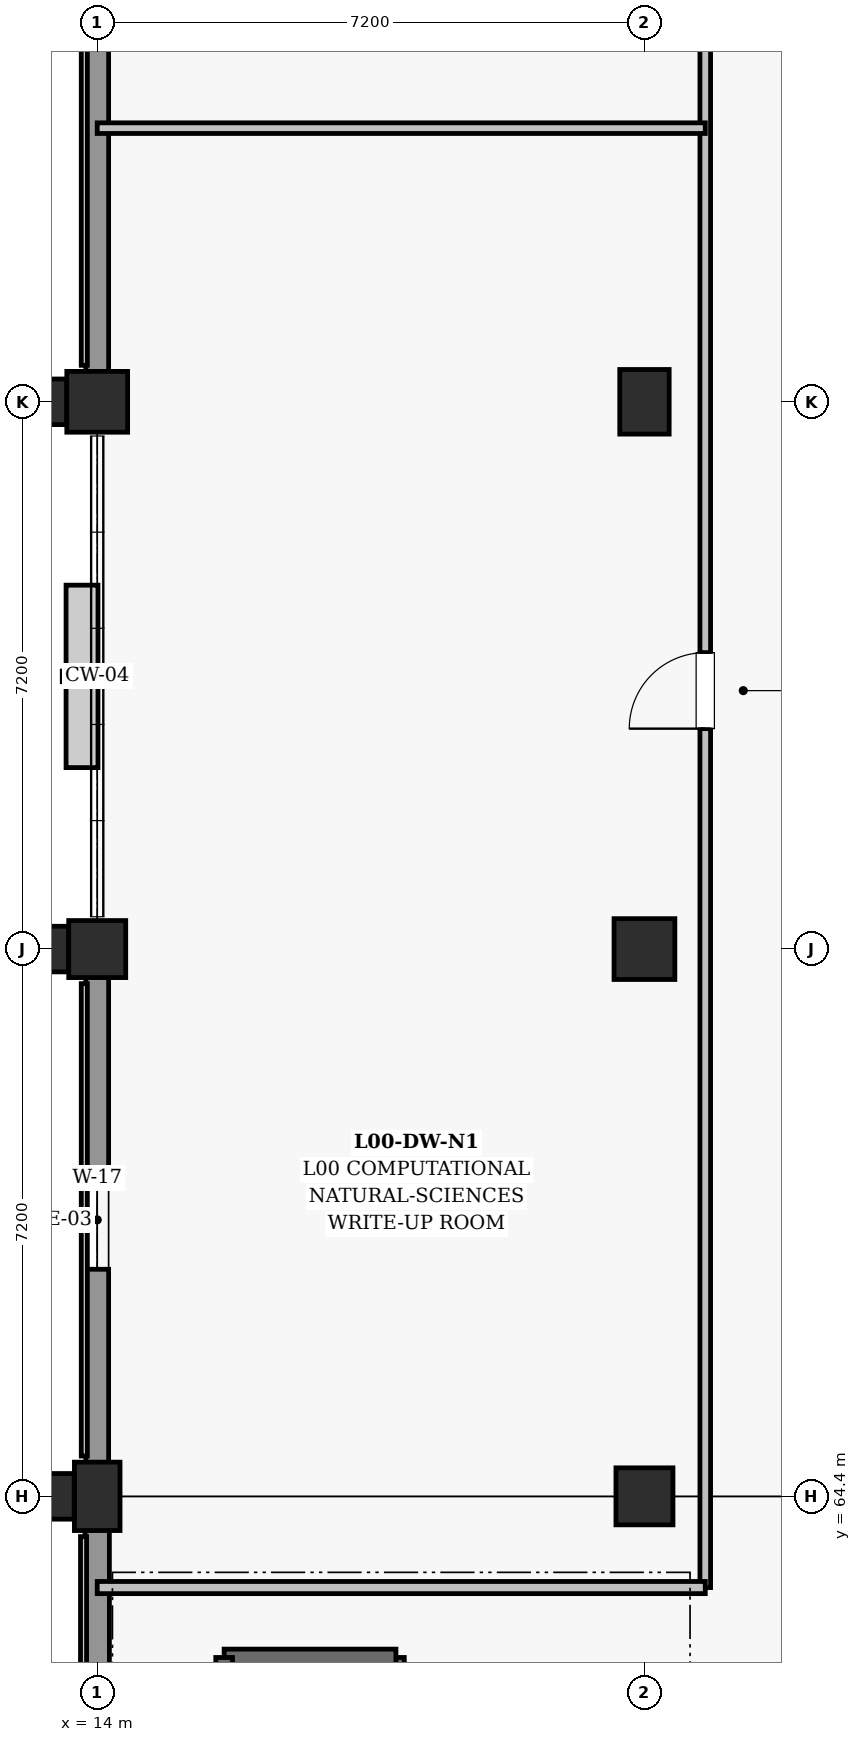
"""IFC4 building model, lengths in metres.
Left out: names, types, materials, properties, quantities, classifications, styles, units other than length and angle.
Written with IfcOpenShell. Run it as: python <this file> out.ifc"""

import sys

from ifc_helpers import new_model, si_unit, direction, frame, frame_2d, origin, origin_2d, place, context, subcontext, project, spatial, rectangle, extrude, element, fill, save


model = new_model("IFC4")
c1 = context("Model", 3, precision=1e-05, world=origin(), true_north=direction((0.0, 1.0)))
c2 = subcontext(c1, "Body", "Model", "MODEL_VIEW")
j1 = project(units=[si_unit("LENGTHUNIT", "METRE"), si_unit("PLANEANGLEUNIT", "RADIAN")], contexts=[c1])
p1 = place(None, origin())
s1 = spatial("IfcSite", under=j1, at=p1, CompositionType="ELEMENT")
p2 = place(p1, origin())
s2 = spatial("IfcBuilding", under=s1, at=p2, CompositionType="ELEMENT")
p3 = place(p2, origin())
s3 = spatial("IfcBuildingStorey", under=s2, at=p3, CompositionType="ELEMENT", Elevation=0.0)
p4 = place(p3, frame((14.0, 64.4, 0.0), z_axis=(0.0, 0.0, 1.0), x_axis=(1.0, 0.0, 0.0)))
e1 = element("IfcColumn", 1, at=p4, inside=s3, PredefinedType="COLUMN", context=c2, shape_type="SweptSolid", body=[
    extrude(rectangle(XDim=0.6, YDim=0.9, at=origin_2d()), origin(), (0.0, 0.0, 1.0), 5.4),
])
p5 = place(p3, frame((14.0, 71.6, 0.0), z_axis=(0.0, 0.0, 1.0), x_axis=(1.0, 0.0, 0.0)))
e2 = element("IfcColumn", 2, at=p5, inside=s3, PredefinedType="COLUMN", context=c2, shape_type="SweptSolid", body=[
    extrude(rectangle(XDim=0.75, YDim=0.75, at=origin_2d()), origin(), (0.0, 0.0, 1.0), 5.4),
])
p6 = place(p3, frame((14.0, 78.8, 0.0), z_axis=(0.0, 0.0, 1.0), x_axis=(1.0, 0.0, 0.0)))
e3 = element("IfcColumn", 3, at=p6, inside=s3, PredefinedType="COLUMN", context=c2, shape_type="SweptSolid", body=[
    extrude(rectangle(XDim=0.8, YDim=0.8, at=origin_2d()), origin(), (0.0, 0.0, 1.0), 5.4),
])
p7 = place(p3, frame((21.2, 64.4, 0.0), z_axis=(0.0, 0.0, 1.0), x_axis=(1.0, 0.0, 0.0)))
e4 = element("IfcColumn", 4, at=p7, inside=s3, PredefinedType="COLUMN", context=c2, shape_type="SweptSolid", body=[
    extrude(rectangle(XDim=0.75, YDim=0.75, at=origin_2d()), origin(), (0.0, 0.0, 1.0), 5.4),
])
p8 = place(p3, frame((21.2, 71.6, 0.0), z_axis=(0.0, 0.0, 1.0), x_axis=(1.0, 0.0, 0.0)))
e5 = element("IfcColumn", 5, at=p8, inside=s3, PredefinedType="COLUMN", context=c2, shape_type="SweptSolid", body=[
    extrude(rectangle(XDim=0.8, YDim=0.8, at=origin_2d()), origin(), (0.0, 0.0, 1.0), 5.4),
])
p9 = place(p3, frame((21.2, 78.8, 0.0), z_axis=(0.0, 0.0, 1.0), x_axis=(1.0, 0.0, 0.0)))
e6 = element("IfcColumn", 6, at=p9, inside=s3, PredefinedType="COLUMN", context=c2, shape_type="SweptSolid", body=[
    extrude(rectangle(XDim=0.65, YDim=0.85, at=origin_2d()), origin(), (0.0, 0.0, 1.0), 5.4),
])
for number, where, z_axis, x_axis in (
    (7, (13.272, 64.4, 0.0), (0.0, 0.0, 1.0), (0.0, 1.0, 0.0)),
    (8, (13.197, 71.6, 0.0), (0.0, 0.0, 1.0), (0.0, 1.0, 0.0)),
    (9, (13.172, 78.8, 0.0), (0.0, 0.0, 1.0), (0.0, 1.0, 0.0)),
):
    element("IfcColumn", number, at=place(p3, frame(where, z_axis=z_axis, x_axis=x_axis)), inside=s3, PredefinedType="PILASTER", context=c2, shape_type="SweptSolid", body=[
        extrude(rectangle(XDim=0.6, YDim=0.85, at=origin_2d()), origin(), (0.0, 0.0, 1.0), 5.4),
    ])
p10 = place(p3, frame((14.0, 57.605, 0.0), z_axis=(0.0, 0.0, 1.0), x_axis=(0.0, 1.0, 0.0)))
e10 = element("IfcWall", 10, at=p10, inside=s3, PredefinedType="SOLIDWALL", context=c2, shape_type="SweptSolid", body=[
    extrude(rectangle(XDim=6.365, YDim=0.32, at=frame_2d((3.183, 0.0))), origin(), (0.0, 0.0, 1.0), 4.355),
])
p11 = place(p3, frame((14.0, 64.83, 0.0), z_axis=(0.0, 0.0, 1.0), x_axis=(0.0, 1.0, 0.0)))
e11 = element("IfcWall", 11, at=p11, inside=s3, PredefinedType="SOLIDWALL", context=c2, shape_type="SweptSolid", body=[
    extrude(rectangle(XDim=6.415, YDim=0.3, at=frame_2d((3.208, 0.0))), origin(), (0.0, 0.0, 1.0), 4.325),
])
p12 = place(p11, frame((2.558, 0.0, 0.95)))
e12 = element("IfcOpeningElement", 12, at=p12, cuts=e11, PredefinedType="OPENING", context=c2, shape_type="SweptSolid", body=[
    extrude(rectangle(XDim=1.3, YDim=2.35, at=frame_2d((0.65, 1.175))), frame((0.0, 0.16, 0.0), z_axis=(0.0, -1.0, 0.0), x_axis=(1.0, 0.0, 0.0)), (0.0, 0.0, 1.0), 0.32),
])
p13 = place(p3, frame((14.0, 79.18, 0.0), z_axis=(0.0, 0.0, 1.0), x_axis=(0.0, 1.0, 0.0)))
e13 = element("IfcWall", 13, at=p13, inside=s3, PredefinedType="SOLIDWALL", context=c2, shape_type="SweptSolid", body=[
    extrude(rectangle(XDim=6.44, YDim=0.3, at=frame_2d((3.22, 0.0))), origin(), (0.0, 0.0, 1.0), 4.275),
])
p14 = place(p13, frame((4.55, 0.0, 0.95)))
e14 = element("IfcOpeningElement", 14, at=p14, cuts=e13, PredefinedType="OPENING", context=c2, shape_type="SweptSolid", body=[
    extrude(rectangle(XDim=1.1, YDim=2.3, at=frame_2d((0.55, 1.15))), frame((0.0, 0.16, 0.0), z_axis=(0.0, -1.0, 0.0), x_axis=(1.0, 0.0, 0.0)), (0.0, 0.0, 1.0), 0.32),
])
p15 = place(p3, frame((17.93, 59.72, 0.0), z_axis=(0.0, 0.0, 1.0), x_axis=(0.0, 1.0, 0.0)))
e15 = element("IfcWall", 15, at=p15, inside=s3, PredefinedType="SHEAR", context=c2, shape_type="SweptSolid", body=[
    extrude(rectangle(XDim=2.56, YDim=0.22, at=frame_2d((1.28, 0.0))), origin(), (0.0, 0.0, 1.0), 5.095),
])
p16 = place(p15, frame((0.73, 0.0, 0.0)))
e16 = element("IfcOpeningElement", 16, at=p16, cuts=e15, PredefinedType="OPENING", context=c2, shape_type="SweptSolid", body=[
    extrude(rectangle(XDim=1.1, YDim=2.15, at=frame_2d((0.55, 1.075))), frame((0.0, 0.12, 0.0), z_axis=(0.0, -1.0, 0.0), x_axis=(1.0, 0.0, 0.0)), (0.0, 0.0, 1.0), 0.24),
])
p17 = place(p3, frame((17.93, 62.28, 0.0), z_axis=(0.0, 0.0, 1.0), x_axis=(-1.0, 0.0, 0.0)))
e17 = element("IfcWall", 17, at=p17, inside=s3, PredefinedType="SHEAR", context=c2, shape_type="SweptSolid", body=[
    extrude(rectangle(XDim=2.26, YDim=0.22, at=frame_2d((1.13, 0.0))), origin(), (0.0, 0.0, 1.0), 5.095),
])
p18 = place(p3, frame((15.67, 62.28, 0.0), z_axis=(0.0, 0.0, 1.0), x_axis=(0.0, -1.0, 0.0)))
e18 = element("IfcWall", 18, at=p18, inside=s3, PredefinedType="SHEAR", context=c2, shape_type="SweptSolid", body=[
    extrude(rectangle(XDim=2.56, YDim=0.22, at=frame_2d((1.28, 0.0))), origin(), (0.0, 0.0, 1.0), 5.095),
])
p19 = place(p3, frame((22.0, 63.2, 0.0), z_axis=(0.0, 0.0, 1.0), x_axis=(0.0, 1.0, 0.0)))
e19 = element("IfcWall", 19, at=p19, inside=s3, PredefinedType="PARTITIONING", context=c2, shape_type="SweptSolid", body=[
    extrude(rectangle(XDim=39.6, YDim=0.14, at=frame_2d((19.8, 0.0))), origin(), (0.0, 0.0, 1.0), 4.28),
])
p20 = place(p19, frame((11.3, 0.0, 0.0)))
e20 = element("IfcOpeningElement", 20, at=p20, cuts=e19, PredefinedType="OPENING", context=c2, shape_type="SweptSolid", body=[
    extrude(rectangle(XDim=1.0, YDim=2.15, at=frame_2d((0.5, 1.075))), frame((0.0, 0.08, 0.0), z_axis=(0.0, -1.0, 0.0), x_axis=(1.0, 0.0, 0.0)), (0.0, 0.0, 1.0), 0.16),
])
p21 = place(p19, frame((26.3, 0.0, 0.0)))
e21 = element("IfcOpeningElement", 21, at=p21, cuts=e19, PredefinedType="OPENING", context=c2, shape_type="SweptSolid", body=[
    extrude(rectangle(XDim=1.1, YDim=2.15, at=frame_2d((0.55, 1.075))), frame((0.0, 0.08, 0.0), z_axis=(0.0, -1.0, 0.0), x_axis=(1.0, 0.0, 0.0)), (0.0, 0.0, 1.0), 0.16),
])
p22 = place(p3, frame((14.0, 63.2, 0.0), z_axis=(0.0, 0.0, 1.0), x_axis=(1.0, 0.0, 0.0)))
e22 = element("IfcWall", 22, at=p22, inside=s3, PredefinedType="PARTITIONING", context=c2, shape_type="SweptSolid", body=[
    extrude(rectangle(XDim=8.0, YDim=0.16, at=frame_2d((4.0, 0.0))), origin(), (0.0, 0.0, 1.0), 4.48),
])
p23 = place(p3, frame((14.0, 82.4, 0.0), z_axis=(0.0, 0.0, 1.0), x_axis=(1.0, 0.0, 0.0)))
e23 = element("IfcWall", 23, at=p23, inside=s3, PredefinedType="PARTITIONING", context=c2, shape_type="SweptSolid", body=[
    extrude(rectangle(XDim=8.0, YDim=0.14, at=frame_2d((4.0, 0.0))), origin(), (0.0, 0.0, 1.0), 4.48),
])
p24 = place(p12, origin())
e24 = element("IfcWindow", 24, at=p24, inside=s3, PartitioningType="SINGLE_PANEL", PredefinedType="WINDOW", context=c2, shape_type="SweptSolid", body=[
    extrude(rectangle(XDim=1.3, YDim=2.35, at=frame_2d((0.65, 1.175))), frame((0.0, 0.03, 0.0), z_axis=(0.0, -1.0, 0.0), x_axis=(1.0, 0.0, 0.0)), (0.0, 0.0, 1.0), 0.06),
])
fill(e12, e24)
p25 = place(p20, origin())
e25 = element("IfcDoor", 25, at=p25, inside=s3, OperationType="SINGLE_SWING_LEFT", PredefinedType="DOOR", context=c2, shape_type="SweptSolid", body=[
    extrude(rectangle(XDim=1.0, YDim=2.15, at=frame_2d((0.5, 1.075))), frame((0.0, 0.025, 0.0), z_axis=(0.0, -1.0, 0.0), x_axis=(1.0, 0.0, 0.0)), (0.0, 0.0, 1.0), 0.05),
])
fill(e20, e25)
save(model, sys.argv[1])
